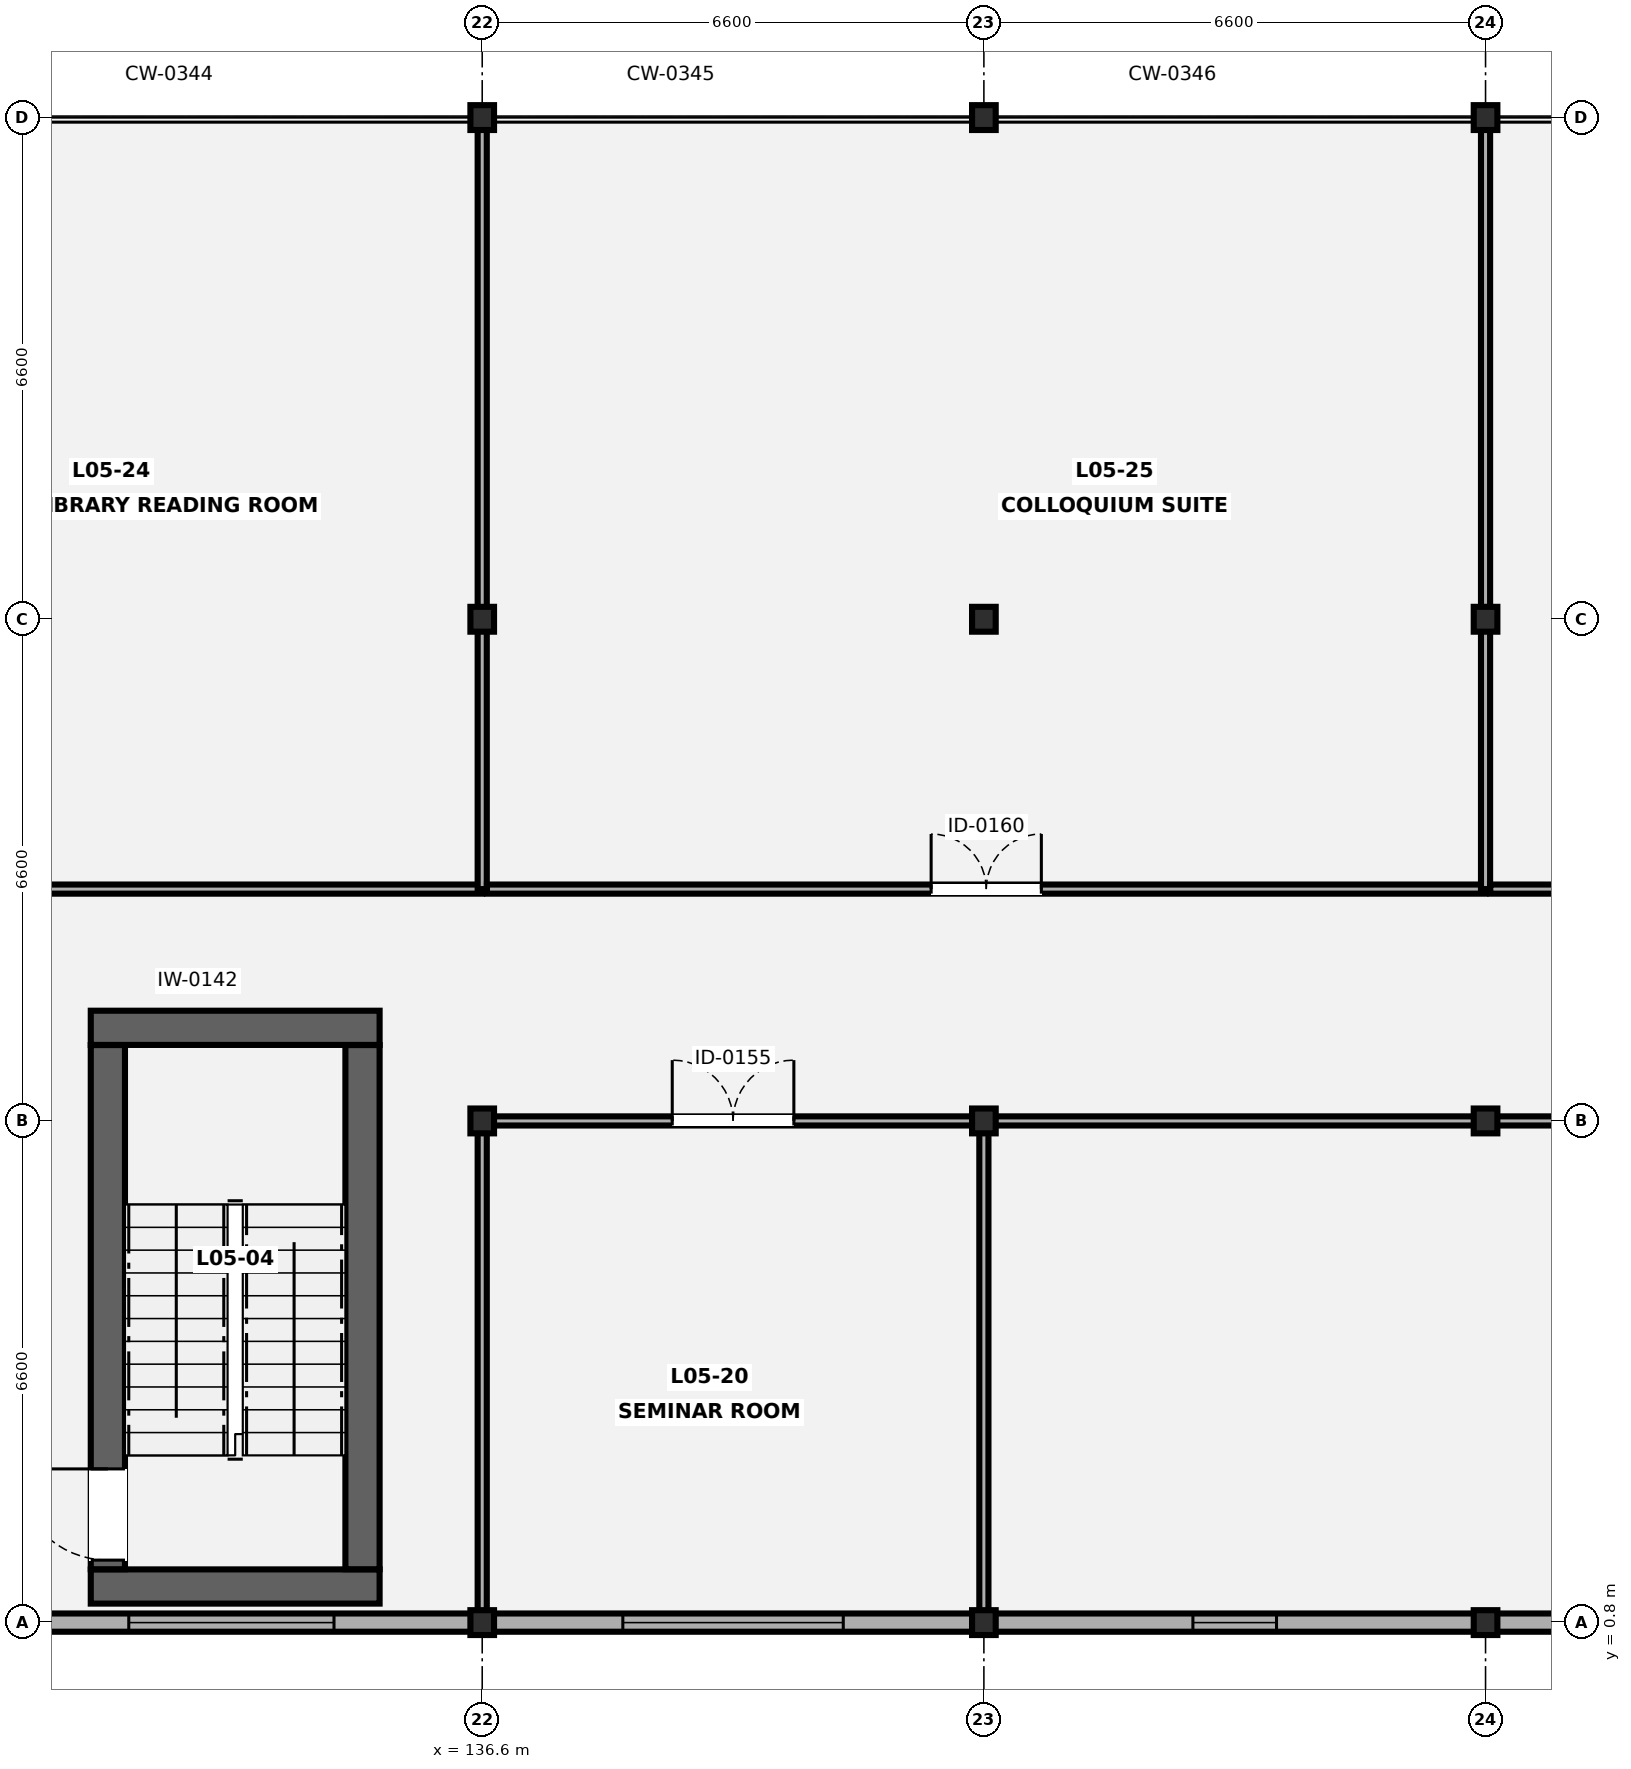
"""IFC4 building model, lengths in metres.
Left out: names, types, materials, properties, quantities, classifications, styles, units other than length and angle.
Written with IfcOpenShell. Run it as: python <this file> out.ifc"""

import sys

from ifc_helpers import new_model, si_unit, direction, frame, frame_2d, origin, origin_2d, place, context, subcontext, project, spatial, rectangle, i_section, extrude, element, fill, save


model = new_model("IFC4")
c1 = context("Model", 3, precision=1e-05, world=origin(), true_north=direction((0.0, 1.0)))
c2 = subcontext(c1, "Body", "Model", "MODEL_VIEW")
j1 = project(units=[si_unit("LENGTHUNIT", "METRE"), si_unit("PLANEANGLEUNIT", "RADIAN")], contexts=[c1])
p1 = place(None, origin())
s1 = spatial("IfcSite", under=j1, at=p1, CompositionType="ELEMENT")
p2 = place(p1, origin())
s2 = spatial("IfcBuilding", under=s1, at=p2, CompositionType="ELEMENT")
p3 = place(p2, frame((0.0, 0.0, 21.7)))
s3 = spatial("IfcBuildingStorey", under=s2, at=p3, CompositionType="ELEMENT", Elevation=21.7)
for number, where, z_axis, x_axis in (
    (1, (136.6, 0.8, 0.0), (0.0, 0.0, 1.0), (1.0, 0.0, 0.0)),
    (2, (136.6, 7.4, 0.0), (0.0, 0.0, 1.0), (1.0, 0.0, 0.0)),
    (3, (136.6, 14.0, 0.0), (0.0, 0.0, 1.0), (1.0, 0.0, 0.0)),
    (4, (136.6, 20.6, 0.0), (0.0, 0.0, 1.0), (1.0, 0.0, 0.0)),
    (5, (143.2, 0.8, 0.0), (0.0, 0.0, 1.0), (1.0, 0.0, 0.0)),
    (6, (143.2, 7.4, 0.0), (0.0, 0.0, 1.0), (1.0, 0.0, 0.0)),
    (7, (143.2, 14.0, 0.0), (0.0, 0.0, 1.0), (1.0, 0.0, 0.0)),
    (8, (143.2, 20.6, 0.0), (0.0, 0.0, 1.0), (1.0, 0.0, 0.0)),
    (9, (149.8, 0.8, 0.0), (0.0, 0.0, 1.0), (1.0, 0.0, 0.0)),
    (10, (149.8, 7.4, 0.0), (0.0, 0.0, 1.0), (1.0, 0.0, 0.0)),
    (11, (149.8, 14.0, 0.0), (0.0, 0.0, 1.0), (1.0, 0.0, 0.0)),
    (12, (149.8, 20.6, 0.0), (0.0, 0.0, 1.0), (1.0, 0.0, 0.0)),
):
    element("IfcColumn", number, at=place(p3, frame(where, z_axis=z_axis, x_axis=x_axis)), inside=s3, PredefinedType="COLUMN", context=c2, shape_type="SweptSolid", body=[
        extrude(i_section(OverallWidth=0.311, OverallDepth=0.327, WebThickness=0.016, FlangeThickness=0.025, FilletRadius=0.017, at=origin_2d()), origin(), (0.0, 0.0, 1.0), 4.2),
    ])
p4 = place(p3, frame((162.046, 0.8, 0.0), z_axis=(0.0, 0.0, 1.0), x_axis=(-1.0, 0.0, 0.0)))
e13 = element("IfcWall", 13, at=p4, inside=s3, PredefinedType="SOLIDWALL", context=c2, shape_type="SweptSolid", body=[
    extrude(rectangle(XDim=58.293, YDim=0.24, at=frame_2d((29.146, 0.0))), origin(), (0.0, 0.0, 1.0), 3.505),
])
p5 = place(p4, frame((54.471, 0.0, 0.85)))
e14 = element("IfcOpeningElement", 14, at=p5, cuts=e13, PredefinedType="OPENING", context=c2, shape_type="SweptSolid", body=[
    extrude(rectangle(XDim=1.35, YDim=1.5, at=frame_2d((0.675, 0.75))), frame((0.0, 0.13, 0.0), z_axis=(0.0, -1.0, 0.0), x_axis=(1.0, 0.0, 0.0)), (0.0, 0.0, 1.0), 0.26),
])
p6 = place(p4, frame((47.747, 0.0, 0.85)))
e15 = element("IfcOpeningElement", 15, at=p6, cuts=e13, PredefinedType="OPENING", context=c2, shape_type="SweptSolid", body=[
    extrude(rectangle(XDim=1.6, YDim=1.5, at=frame_2d((0.8, 0.75))), frame((0.0, 0.13, 0.0), z_axis=(0.0, -1.0, 0.0), x_axis=(1.0, 0.0, 0.0)), (0.0, 0.0, 1.0), 0.26),
])
p7 = place(p4, frame((40.971, 0.0, 0.85)))
e16 = element("IfcOpeningElement", 16, at=p7, cuts=e13, PredefinedType="OPENING", context=c2, shape_type="SweptSolid", body=[
    extrude(rectangle(XDim=1.95, YDim=1.5, at=frame_2d((0.975, 0.75))), frame((0.0, 0.13, 0.0), z_axis=(0.0, -1.0, 0.0), x_axis=(1.0, 0.0, 0.0)), (0.0, 0.0, 1.0), 0.26),
])
p8 = place(p4, frame((34.171, 0.0, 0.85)))
e17 = element("IfcOpeningElement", 17, at=p8, cuts=e13, PredefinedType="OPENING", context=c2, shape_type="SweptSolid", body=[
    extrude(rectangle(XDim=2.35, YDim=1.5, at=frame_2d((1.175, 0.75))), frame((0.0, 0.13, 0.0), z_axis=(0.0, -1.0, 0.0), x_axis=(1.0, 0.0, 0.0)), (0.0, 0.0, 1.0), 0.26),
])
p9 = place(p4, frame((27.396, 0.0, 0.85)))
e18 = element("IfcOpeningElement", 18, at=p9, cuts=e13, PredefinedType="OPENING", context=c2, shape_type="SweptSolid", body=[
    extrude(rectangle(XDim=2.7, YDim=1.35, at=frame_2d((1.35, 0.675))), frame((0.0, 0.13, 0.0), z_axis=(0.0, -1.0, 0.0), x_axis=(1.0, 0.0, 0.0)), (0.0, 0.0, 1.0), 0.26),
])
p10 = place(p4, frame((20.697, 0.0, 0.85)))
e19 = element("IfcOpeningElement", 19, at=p10, cuts=e13, PredefinedType="OPENING", context=c2, shape_type="SweptSolid", body=[
    extrude(rectangle(XDim=2.9, YDim=1.35, at=frame_2d((1.45, 0.675))), frame((0.0, 0.13, 0.0), z_axis=(0.0, -1.0, 0.0), x_axis=(1.0, 0.0, 0.0)), (0.0, 0.0, 1.0), 0.26),
])
p11 = place(p4, frame((14.997, 0.0, 0.85)))
e20 = element("IfcOpeningElement", 20, at=p11, cuts=e13, PredefinedType="OPENING", context=c2, shape_type="SweptSolid", body=[
    extrude(rectangle(XDim=1.1, YDim=1.4, at=frame_2d((0.55, 0.7))), frame((0.0, 0.13, 0.0), z_axis=(0.0, -1.0, 0.0), x_axis=(1.0, 0.0, 0.0)), (0.0, 0.0, 1.0), 0.26),
])
p12 = place(p4, frame((8.322, 0.0, 0.85)))
e21 = element("IfcOpeningElement", 21, at=p12, cuts=e13, PredefinedType="OPENING", context=c2, shape_type="SweptSolid", body=[
    extrude(rectangle(XDim=1.25, YDim=1.4, at=frame_2d((0.625, 0.7))), frame((0.0, 0.13, 0.0), z_axis=(0.0, -1.0, 0.0), x_axis=(1.0, 0.0, 0.0)), (0.0, 0.0, 1.0), 0.26),
])
p13 = place(p4, frame((2.046, 0.0, 0.85)))
e22 = element("IfcOpeningElement", 22, at=p13, cuts=e13, PredefinedType="OPENING", context=c2, shape_type="SweptSolid", body=[
    extrude(rectangle(XDim=1.4, YDim=1.4, at=frame_2d((0.7, 0.7))), frame((0.0, 0.13, 0.0), z_axis=(0.0, -1.0, 0.0), x_axis=(1.0, 0.0, 0.0)), (0.0, 0.0, 1.0), 0.26),
])
for number, where, z_axis, x_axis in (
    (23, (131.45, 1.275, 0.0), (0.0, 0.0, 1.0), (1.0, 0.0, 0.0)),
    (24, (131.45, 8.625, 0.0), (0.0, 0.0, 1.0), (1.0, 0.0, 0.0)),
):
    element("IfcWall", number, at=place(p3, frame(where, z_axis=z_axis, x_axis=x_axis)), inside=s3, PredefinedType="SHEAR", context=c2, shape_type="SweptSolid", body=[
        extrude(rectangle(XDim=3.8, YDim=0.45, at=frame_2d((1.9, 0.0))), origin(), (0.0, 0.0, 1.0), 4.02),
    ])
p14 = place(p3, frame((131.675, 1.502, 0.0), z_axis=(0.0, 0.0, 1.0), x_axis=(0.0, 1.0, 0.0)))
e25 = element("IfcWall", 25, at=p14, inside=s3, PredefinedType="SHEAR", context=c2, shape_type="SweptSolid", body=[
    extrude(rectangle(XDim=6.896, YDim=0.45, at=frame_2d((3.448, 0.0))), origin(), (0.0, 0.0, 1.0), 4.02),
])
p15 = place(p14, frame((0.12, 0.0, 0.0)))
e26 = element("IfcOpeningElement", 26, at=p15, cuts=e25, PredefinedType="OPENING", context=c2, shape_type="SweptSolid", body=[
    extrude(rectangle(XDim=1.2, YDim=2.15, at=frame_2d((0.6, 1.075))), frame((0.0, 0.235, 0.0), z_axis=(0.0, -1.0, 0.0), x_axis=(1.0, 0.0, 0.0)), (0.0, 0.0, 1.0), 0.47),
])
p16 = place(p3, frame((135.025, 1.502, 0.0), z_axis=(0.0, 0.0, 1.0), x_axis=(0.0, 1.0, 0.0)))
e27 = element("IfcWall", 27, at=p16, inside=s3, PredefinedType="SHEAR", context=c2, shape_type="SweptSolid", body=[
    extrude(rectangle(XDim=6.896, YDim=0.45, at=frame_2d((3.448, 0.0))), origin(), (0.0, 0.0, 1.0), 4.02),
])
p17 = place(p3, frame((136.6, 7.4, 0.0), z_axis=(0.0, 0.0, 1.0), x_axis=(1.0, 0.0, 0.0)))
e28 = element("IfcWall", 28, at=p17, inside=s3, PredefinedType="PARTITIONING", context=c2, shape_type="SweptSolid", body=[
    extrude(rectangle(XDim=6.6, YDim=0.12, at=frame_2d((3.3, 0.0))), origin(), (0.0, 0.0, 1.0), 3.293),
])
p18 = place(p17, frame((2.5, 0.0, 0.0)))
e29 = element("IfcOpeningElement", 29, at=p18, cuts=e28, PredefinedType="OPENING", context=c2, shape_type="SweptSolid", body=[
    extrude(rectangle(XDim=1.6, YDim=2.18, at=frame_2d((0.8, 1.09))), frame((0.0, 0.07, 0.0), z_axis=(0.0, -1.0, 0.0), x_axis=(1.0, 0.0, 0.0)), (0.0, 0.0, 1.0), 0.14),
])
p19 = place(p3, frame((136.6, 0.8, 0.0), z_axis=(0.0, 0.0, 1.0), x_axis=(0.0, 1.0, 0.0)))
e30 = element("IfcWall", 30, at=p19, inside=s3, PredefinedType="PARTITIONING", context=c2, shape_type="SweptSolid", body=[
    extrude(rectangle(XDim=6.538, YDim=0.12, at=frame_2d((3.269, 0.0))), origin(), (0.0, 0.0, 1.0), 3.372),
])
p20 = place(p3, frame((143.2, 0.8, 0.0), z_axis=(0.0, 0.0, 1.0), x_axis=(0.0, 1.0, 0.0)))
e31 = element("IfcWall", 31, at=p20, inside=s3, PredefinedType="PARTITIONING", context=c2, shape_type="SweptSolid", body=[
    extrude(rectangle(XDim=6.6, YDim=0.12, at=frame_2d((3.3, 0.0))), origin(), (0.0, 0.0, 1.0), 3.372),
])
p21 = place(p3, frame((143.202, 7.4, 0.0), z_axis=(0.0, 0.0, 1.0), x_axis=(1.0, 0.0, 0.0)))
e32 = element("IfcWall", 32, at=p21, inside=s3, PredefinedType="PARTITIONING", context=c2, shape_type="SweptSolid", body=[
    extrude(rectangle(XDim=18.998, YDim=0.12, at=frame_2d((9.499, 0.0))), origin(), (0.0, 0.0, 1.0), 3.293),
])
p22 = place(p21, frame((8.774, 0.0, 0.0)))
e33 = element("IfcOpeningElement", 33, at=p22, cuts=e32, PredefinedType="OPENING", context=c2, shape_type="SweptSolid", body=[
    extrude(rectangle(XDim=1.45, YDim=2.12, at=frame_2d((0.725, 1.06))), frame((0.0, 0.07, 0.0), z_axis=(0.0, -1.0, 0.0), x_axis=(1.0, 0.0, 0.0)), (0.0, 0.0, 1.0), 0.14),
])
p23 = place(p3, frame((123.462, 10.45, 0.0), z_axis=(0.0, 0.0, 1.0), x_axis=(1.0, 0.0, 0.0)))
e34 = element("IfcWall", 34, at=p23, inside=s3, PredefinedType="PARTITIONING", context=c2, shape_type="SweptSolid", body=[
    extrude(rectangle(XDim=13.138, YDim=0.12, at=frame_2d((6.569, 0.0))), origin(), (0.0, 0.0, 1.0), 3.546),
])
p24 = place(p23, frame((5.769, 0.0, 0.0)))
e35 = element("IfcOpeningElement", 35, at=p24, cuts=e34, PredefinedType="OPENING", context=c2, shape_type="SweptSolid", body=[
    extrude(rectangle(XDim=1.6, YDim=2.18, at=frame_2d((0.8, 1.09))), frame((0.0, 0.07, 0.0), z_axis=(0.0, -1.0, 0.0), x_axis=(1.0, 0.0, 0.0)), (0.0, 0.0, 1.0), 0.14),
])
p25 = place(p3, frame((136.6, 10.45, 0.0), z_axis=(0.0, 0.0, 1.0), x_axis=(0.0, 1.0, 0.0)))
e36 = element("IfcWall", 36, at=p25, inside=s3, PredefinedType="PARTITIONING", context=c2, shape_type="SweptSolid", body=[
    extrude(rectangle(XDim=10.15, YDim=0.12, at=frame_2d((5.075, 0.0))), origin(), (0.0, 0.0, 1.0), 3.372),
])
p26 = place(p3, frame((136.662, 10.45, 0.0), z_axis=(0.0, 0.0, 1.0), x_axis=(1.0, 0.0, 0.0)))
e37 = element("IfcWall", 37, at=p26, inside=s3, PredefinedType="PARTITIONING", context=c2, shape_type="SweptSolid", body=[
    extrude(rectangle(XDim=13.138, YDim=0.12, at=frame_2d((6.569, 0.0))), origin(), (0.0, 0.0, 1.0), 3.546),
])
p27 = place(p26, frame((5.844, 0.0, 0.0)))
e38 = element("IfcOpeningElement", 38, at=p27, cuts=e37, PredefinedType="OPENING", context=c2, shape_type="SweptSolid", body=[
    extrude(rectangle(XDim=1.45, YDim=2.12, at=frame_2d((0.725, 1.06))), frame((0.0, 0.07, 0.0), z_axis=(0.0, -1.0, 0.0), x_axis=(1.0, 0.0, 0.0)), (0.0, 0.0, 1.0), 0.14),
])
p28 = place(p3, frame((149.8, 10.45, 0.0), z_axis=(0.0, 0.0, 1.0), x_axis=(0.0, 1.0, 0.0)))
e39 = element("IfcWall", 39, at=p28, inside=s3, PredefinedType="PARTITIONING", context=c2, shape_type="SweptSolid", body=[
    extrude(rectangle(XDim=10.15, YDim=0.12, at=frame_2d((5.075, 0.0))), origin(), (0.0, 0.0, 1.0), 3.372),
])
p29 = place(p3, frame((149.862, 10.45, 0.0), z_axis=(0.0, 0.0, 1.0), x_axis=(1.0, 0.0, 0.0)))
e40 = element("IfcWall", 40, at=p29, inside=s3, PredefinedType="PARTITIONING", context=c2, shape_type="SweptSolid", body=[
    extrude(rectangle(XDim=12.338, YDim=0.12, at=frame_2d((6.169, 0.0))), origin(), (0.0, 0.0, 1.0), 3.546),
])
p30 = place(p29, frame((5.629, 0.0, 0.0)))
e41 = element("IfcOpeningElement", 41, at=p30, cuts=e40, PredefinedType="OPENING", context=c2, shape_type="SweptSolid", body=[
    extrude(rectangle(XDim=1.08, YDim=2.12, at=frame_2d((0.54, 1.06))), frame((0.0, 0.07, 0.0), z_axis=(0.0, -1.0, 0.0), x_axis=(1.0, 0.0, 0.0)), (0.0, 0.0, 1.0), 0.14),
])
p31 = place(p9, origin())
e42 = element("IfcWindow", 42, at=p31, inside=s3, PartitioningType="SINGLE_PANEL", PredefinedType="WINDOW", context=c2, shape_type="SweptSolid", body=[
    extrude(rectangle(XDim=2.7, YDim=1.35, at=frame_2d((1.35, 0.675))), frame((0.0, 0.03, 0.0), z_axis=(0.0, -1.0, 0.0), x_axis=(1.0, 0.0, 0.0)), (0.0, 0.0, 1.0), 0.06),
])
fill(e18, e42)
p32 = place(p10, origin())
e43 = element("IfcWindow", 43, at=p32, inside=s3, PartitioningType="SINGLE_PANEL", PredefinedType="WINDOW", context=c2, shape_type="SweptSolid", body=[
    extrude(rectangle(XDim=2.9, YDim=1.35, at=frame_2d((1.45, 0.675))), frame((0.0, 0.03, 0.0), z_axis=(0.0, -1.0, 0.0), x_axis=(1.0, 0.0, 0.0)), (0.0, 0.0, 1.0), 0.06),
])
fill(e19, e43)
p33 = place(p11, origin())
e44 = element("IfcWindow", 44, at=p33, inside=s3, PartitioningType="SINGLE_PANEL", PredefinedType="WINDOW", context=c2, shape_type="SweptSolid", body=[
    extrude(rectangle(XDim=1.1, YDim=1.4, at=frame_2d((0.55, 0.7))), frame((0.0, 0.03, 0.0), z_axis=(0.0, -1.0, 0.0), x_axis=(1.0, 0.0, 0.0)), (0.0, 0.0, 1.0), 0.06),
])
fill(e20, e44)
p34 = place(p15, origin())
e45 = element("IfcDoor", 45, at=p34, inside=s3, OperationType="SINGLE_SWING_RIGHT", PredefinedType="DOOR", context=c2, shape_type="SweptSolid", body=[
    extrude(rectangle(XDim=1.2, YDim=2.15, at=frame_2d((0.6, 1.075))), frame((0.0, 0.025, 0.0), z_axis=(0.0, -1.0, 0.0), x_axis=(1.0, 0.0, 0.0)), (0.0, 0.0, 1.0), 0.05),
])
fill(e26, e45)
p35 = place(p18, origin())
e46 = element("IfcDoor", 46, at=p35, inside=s3, OperationType="DOUBLE_DOOR_SINGLE_SWING", PredefinedType="DOOR", context=c2, shape_type="SweptSolid", body=[
    extrude(rectangle(XDim=1.6, YDim=2.18, at=frame_2d((0.8, 1.09))), frame((0.0, 0.025, 0.0), z_axis=(0.0, -1.0, 0.0), x_axis=(1.0, 0.0, 0.0)), (0.0, 0.0, 1.0), 0.05),
])
fill(e29, e46)
p36 = place(p27, origin())
e47 = element("IfcDoor", 47, at=p36, inside=s3, OperationType="DOUBLE_DOOR_SINGLE_SWING", PredefinedType="DOOR", context=c2, shape_type="SweptSolid", body=[
    extrude(rectangle(XDim=1.45, YDim=2.12, at=frame_2d((0.725, 1.06))), frame((0.0, 0.025, 0.0), z_axis=(0.0, -1.0, 0.0), x_axis=(1.0, 0.0, 0.0)), (0.0, 0.0, 1.0), 0.05),
])
fill(e38, e47)
save(model, sys.argv[1])
